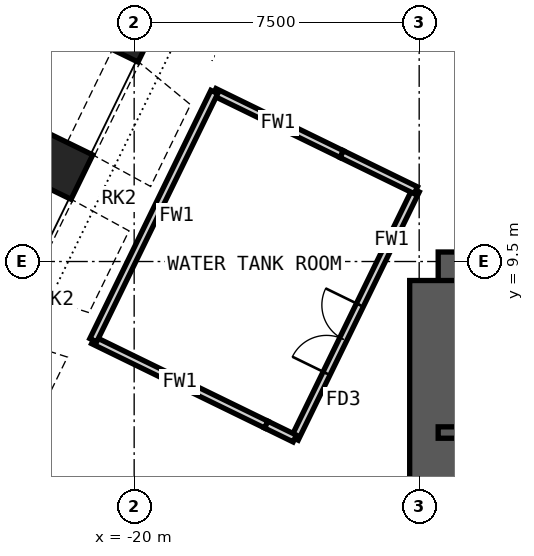
"""IFC4 building model, lengths in metres.
Left out: names, types, materials, properties, quantities, classifications, styles, units other than length and angle.
Written with IfcOpenShell. Run it as: python <this file> out.ifc"""

import sys

from ifc_helpers import new_model, si_unit, direction, frame, frame_2d, origin, origin_2d, place, context, subcontext, project, spatial, rectangle, hollow_rectangle, extrude, clip, halfspace, element, fill, save


model = new_model("IFC4")
c1 = context("Model", 3, precision=1e-05, world=origin(), true_north=direction((0.0, 1.0)))
c2 = subcontext(c1, "Body", "Model", "MODEL_VIEW")
j1 = project(units=[si_unit("LENGTHUNIT", "METRE"), si_unit("PLANEANGLEUNIT", "RADIAN")], contexts=[c1])
p1 = place(None, origin())
s1 = spatial("IfcSite", under=j1, at=p1, CompositionType="ELEMENT")
p2 = place(p1, origin())
s2 = spatial("IfcBuilding", under=s1, at=p2, CompositionType="ELEMENT")
p3 = place(p2, frame((0.0, 0.0, 174.4)))
s3 = spatial("IfcBuildingStorey", under=s2, at=p3, CompositionType="ELEMENT", Elevation=174.4)
p4 = place(p3, frame((-23.721, 8.394, 0.0), z_axis=(0.304167290681, -0.096980316438, 0.94766928699), x_axis=(0.678344568821, -0.676396463833, -0.286943321346)))
e1 = element("IfcColumn", 1, at=p4, inside=s3, PredefinedType="COLUMN", context=c2, shape_type="Clipping", body=[
    clip(clip(extrude(hollow_rectangle(XDim=1.3, YDim=1.3, WallThickness=0.1, at=origin_2d()), origin(), (0.0, 0.0, 1.0), 6.331), halfspace(frame((0.0, 0.0, 0.228), z_axis=(0.0, 0.0, -1.0), x_axis=(0.0, -1.0, 0.0)), False)), halfspace(frame((0.0, 0.0, 6.104), z_axis=(0.0, 0.0, 1.0), x_axis=(0.0, 1.0, 0.0)), False)),
])
p5 = place(p3, frame((-21.959, 12.006, 0.0), z_axis=(0.277749131773, -0.151843396942, 0.948577357206), x_axis=(0.537800849701, -0.793615020284, -0.284509131032)))
e2 = element("IfcColumn", 2, at=p5, inside=s3, PredefinedType="COLUMN", context=c2, shape_type="Clipping", body=[
    clip(clip(extrude(hollow_rectangle(XDim=1.3, YDim=1.3, WallThickness=0.1, at=origin_2d()), origin(), (0.0, 0.0, 1.0), 6.325), halfspace(frame((0.0, 0.0, 0.208), z_axis=(0.0, 0.0, -1.0), x_axis=(0.0, -1.0, 0.0)), False)), halfspace(frame((0.0, 0.0, 6.117), z_axis=(0.0, 0.0, 1.0), x_axis=(0.0, 1.0, 0.0)), False)),
])
p6 = place(p3, frame((-20.198, 15.618, 0.0), z_axis=(0.250314791265, -0.206048758672, 0.945984362621), x_axis=(0.377848449049, -0.878815432327, -0.291400043677)))
e3 = element("IfcColumn", 3, at=p6, inside=s3, PredefinedType="COLUMN", context=c2, shape_type="Clipping", body=[
    clip(clip(extrude(hollow_rectangle(XDim=1.3, YDim=1.3, WallThickness=0.1, at=origin_2d()), origin(), (0.0, 0.0, 1.0), 6.343), halfspace(frame((0.0, 0.0, 0.226), z_axis=(0.0, 0.0, -1.0), x_axis=(0.0, -1.0, 0.0)), False)), halfspace(frame((0.0, 0.0, 6.116), z_axis=(0.0, 0.0, 1.0), x_axis=(0.0, 1.0, 0.0)), False)),
])
p7 = place(p3, frame((-12.0, 9.0, 0.0), z_axis=(0.0, 0.0, 1.0), x_axis=(1.0, 0.0, 0.0)))
e4 = element("IfcWall", 4, at=p7, inside=s3, PredefinedType="SHEAR", context=c2, shape_type="SweptSolid", body=[
    extrude(rectangle(XDim=24.0, YDim=1.5, at=frame_2d((12.0, 0.0))), origin(), (0.0, 0.0, 1.0), 6.0),
])
p8 = place(p7, frame((10.4, 0.0, 0.0)))
e5 = element("IfcOpeningElement", 5, at=p8, cuts=e4, PredefinedType="OPENING", context=c2, shape_type="SweptSolid", body=[
    extrude(rectangle(XDim=1.0, YDim=2.1, at=frame_2d((0.5, 1.05))), frame((0.0, 0.76, 0.0), z_axis=(0.0, -1.0, 0.0), x_axis=(1.0, 0.0, 0.0)), (0.0, 0.0, 1.0), 1.52),
])
p9 = place(p7, frame((17.6, 0.0, 0.0)))
e6 = element("IfcOpeningElement", 6, at=p9, cuts=e4, PredefinedType="OPENING", context=c2, shape_type="SweptSolid", body=[
    extrude(rectangle(XDim=0.9, YDim=2.1, at=frame_2d((0.45, 1.05))), frame((0.0, 0.76, 0.0), z_axis=(0.0, -1.0, 0.0), x_axis=(1.0, 0.0, 0.0)), (0.0, 0.0, 1.0), 1.52),
])
p10 = place(p7, frame((21.9, 0.0, 0.0)))
e7 = element("IfcOpeningElement", 7, at=p10, cuts=e4, PredefinedType="OPENING", context=c2, shape_type="SweptSolid", body=[
    extrude(rectangle(XDim=0.9, YDim=2.1, at=frame_2d((0.45, 1.05))), frame((0.0, 0.76, 0.0), z_axis=(0.0, -1.0, 0.0), x_axis=(1.0, 0.0, 0.0)), (0.0, 0.0, 1.0), 1.52),
])
p11 = place(p3, frame((-12.0, -9.0, 0.0), z_axis=(0.0, 0.0, 1.0), x_axis=(0.0, 1.0, 0.0)))
e8 = element("IfcWall", 8, at=p11, inside=s3, PredefinedType="SHEAR", context=c2, shape_type="SweptSolid", body=[
    extrude(rectangle(XDim=18.0, YDim=1.5, at=frame_2d((9.0, 0.0))), origin(), (0.0, 0.0, 1.0), 6.0),
])
p12 = place(p11, frame((8.1, 0.0, 0.0)))
e9 = element("IfcOpeningElement", 9, at=p12, cuts=e8, PredefinedType="OPENING", context=c2, shape_type="SweptSolid", body=[
    extrude(rectangle(XDim=1.8, YDim=2.1, at=frame_2d((0.9, 1.05))), frame((0.0, 0.76, 0.0), z_axis=(0.0, -1.0, 0.0), x_axis=(1.0, 0.0, 0.0)), (0.0, 0.0, 1.0), 1.52),
])
p13 = place(p3, frame((-12.0, 5.0, 0.0), z_axis=(0.0, 0.0, 1.0), x_axis=(1.0, 0.0, 0.0)))
e10 = element("IfcWall", 10, at=p13, inside=s3, PredefinedType="SHEAR", context=c2, shape_type="SweptSolid", body=[
    extrude(rectangle(XDim=24.0, YDim=0.3, at=frame_2d((12.0, 0.0))), origin(), (0.0, 0.0, 1.0), 6.0),
])
p14 = place(p3, frame((-21.076, 7.429, 0.0), z_axis=(0.0, 0.0, 1.0), x_axis=(0.898798552874, -0.438361906821, 0.0)))
e11 = element("IfcWall", 11, at=p14, inside=s3, PredefinedType="PARTITIONING", context=c2, shape_type="SweptSolid", body=[
    extrude(rectangle(XDim=5.065, YDim=0.2, at=frame_2d((2.533, 0.0))), origin(), (0.0, 0.0, 1.0), 4.73),
])
p15 = place(p3, frame((-17.891, 13.96, 0.0), z_axis=(0.0, 0.0, 1.0), x_axis=(0.898808707495, -0.438341085607, 0.0)))
e12 = element("IfcWall", 12, at=p15, inside=s3, PredefinedType="PARTITIONING", context=c2, shape_type="SweptSolid", body=[
    extrude(rectangle(XDim=3.729, YDim=0.2, at=frame_2d((1.865, 0.0))), origin(), (0.0, 0.0, 1.0), 4.63),
])
p16 = place(p3, frame((-15.773, 4.843, 0.0), z_axis=(0.0, 0.0, 1.0), x_axis=(0.438349498419, 0.898804604592, 0.0)))
e13 = element("IfcWall", 13, at=p16, inside=s3, PredefinedType="PARTITIONING", context=c2, shape_type="SweptSolid", body=[
    extrude(rectangle(XDim=7.267, YDim=0.2, at=frame_2d((3.634, 0.0))), origin(), (0.0, 0.0, 1.0), 5.83),
])
p17 = place(p16, frame((1.907, 0.0, 0.0)))
e14 = element("IfcOpeningElement", 14, at=p17, cuts=e13, PredefinedType="OPENING", context=c2, shape_type="SweptSolid", body=[
    extrude(rectangle(XDim=2.0, YDim=2.4, at=frame_2d((1.0, 1.2))), frame((0.0, 0.11, 0.0), z_axis=(0.0, -1.0, 0.0), x_axis=(1.0, 0.0, 0.0)), (0.0, 0.0, 1.0), 0.22),
])
p18 = place(p3, frame((-21.076, 7.429, 0.0), z_axis=(0.0, 0.0, 1.0), x_axis=(0.438389874604, 0.898784911892, 0.0)))
e15 = element("IfcWall", 15, at=p18, inside=s3, PredefinedType="PARTITIONING", context=c2, shape_type="SweptSolid", body=[
    extrude(rectangle(XDim=7.267, YDim=0.2, at=frame_2d((3.634, 0.0))), origin(), (0.0, 0.0, 1.0), 5.83),
])
p19 = place(p3, frame((-16.524, 5.208, 0.0), z_axis=(0.0, 0.0, 1.0), x_axis=(0.89877125652, -0.438417869679, 0.0)))
e16 = element("IfcWall", 16, at=p19, inside=s3, PredefinedType="PARTITIONING", context=c2, shape_type="SweptSolid", body=[
    extrude(rectangle(XDim=0.835, YDim=0.2, at=frame_2d((0.417, 0.0))), origin(), (0.0, 0.0, 1.0), 5.83),
])
p20 = place(p3, frame((-14.539, 12.326, 0.0), z_axis=(0.0, 0.0, 1.0), x_axis=(0.89879330979, -0.438372656853, 0.0)))
e17 = element("IfcWall", 17, at=p20, inside=s3, PredefinedType="PARTITIONING", context=c2, shape_type="SweptSolid", body=[
    extrude(rectangle(XDim=2.17, YDim=0.2, at=frame_2d((1.085, 0.0))), origin(), (0.0, 0.0, 1.0), 5.83),
])
p21 = place(p17, origin())
e18 = element("IfcDoor", 18, at=p21, inside=s3, OperationType="DOUBLE_DOOR_DOUBLE_SWING", PredefinedType="DOOR", context=c2, shape_type="SweptSolid", body=[
    extrude(rectangle(XDim=2.0, YDim=2.4, at=frame_2d((1.0, 1.2))), frame((0.0, 0.025, 0.0), z_axis=(0.0, -1.0, 0.0), x_axis=(1.0, 0.0, 0.0)), (0.0, 0.0, 1.0), 0.05),
])
fill(e14, e18)
save(model, sys.argv[1])
